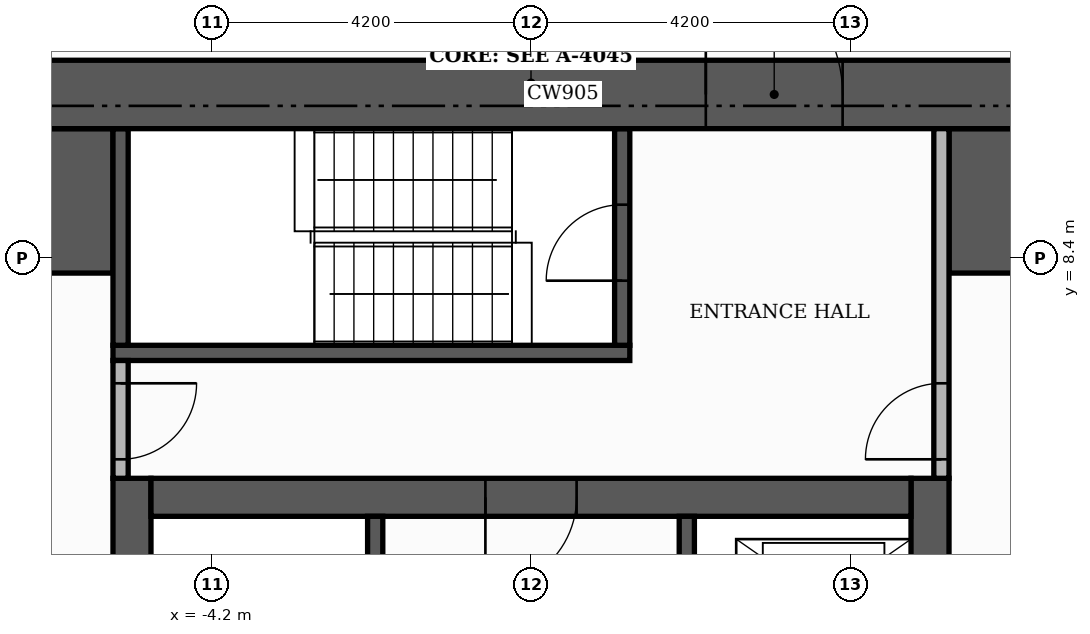
"""IFC4 building model, lengths in metres.
Left out: names, types, materials, properties, quantities, classifications, styles, units other than length and angle.
Written with IfcOpenShell. Run it as: python <this file> out.ifc"""

import sys

from ifc_helpers import new_model, si_unit, direction, frame, frame_2d, origin, place, context, subcontext, project, spatial, rectangle, extrude, element, fill, save


model = new_model("IFC4")
c1 = context("Model", 3, precision=1e-05, world=origin(), true_north=direction((0.0, 1.0)))
c2 = subcontext(c1, "Body", "Model", "MODEL_VIEW")
j1 = project(units=[si_unit("LENGTHUNIT", "METRE"), si_unit("PLANEANGLEUNIT", "RADIAN")], contexts=[c1])
p1 = place(None, origin())
s1 = spatial("IfcSite", under=j1, at=p1, CompositionType="ELEMENT")
p2 = place(p1, origin())
s2 = spatial("IfcBuilding", under=s1, at=p2, CompositionType="ELEMENT")
p3 = place(p2, frame((0.0, 0.0, 279.6)))
s3 = spatial("IfcBuildingStorey", under=s2, at=p3, CompositionType="ELEMENT", Elevation=279.6)
for number, where, z_axis, x_axis in (
    (1, (-5.25, -5.0, 0.0), (0.0, 0.0, 1.0), (0.0, 1.0, 0.0)),
    (2, (5.25, -5.0, 0.0), (0.0, 0.0, 1.0), (0.0, 1.0, 0.0)),
):
    element("IfcWall", number, at=place(p3, frame(where, z_axis=z_axis, x_axis=x_axis)), inside=s3, PredefinedType="SHEAR", context=c2, shape_type="SweptSolid", body=[
        extrude(rectangle(XDim=10.5, YDim=0.5, at=frame_2d((5.25, 0.0))), origin(), (0.0, 0.0, 1.0), 3.48),
    ])
p4 = place(p3, frame((-5.0, 5.25, 0.0), z_axis=(0.0, 0.0, 1.0), x_axis=(1.0, 0.0, 0.0)))
e3 = element("IfcWall", 3, at=p4, inside=s3, PredefinedType="SHEAR", context=c2, shape_type="SweptSolid", body=[
    extrude(rectangle(XDim=10.0, YDim=0.5, at=frame_2d((5.0, 0.0))), origin(), (0.0, 0.0, 1.0), 3.48),
])
p5 = place(p4, frame((4.4, 0.0, 0.0)))
e4 = element("IfcOpeningElement", 4, at=p5, cuts=e3, PredefinedType="OPENING", context=c2, shape_type="SweptSolid", body=[
    extrude(rectangle(XDim=1.2, YDim=2.1, at=frame_2d((0.6, 1.05))), frame((0.0, 0.26, 0.0), z_axis=(0.0, -1.0, 0.0), x_axis=(1.0, 0.0, 0.0)), (0.0, 0.0, 1.0), 0.52),
])
for number, where, z_axis, x_axis in (
    (5, (-10.1, 9.15, 0.0), (0.0, 0.0, 1.0), (1.0, 0.0, 0.0)),
    (6, (5.5, 9.15, 0.0), (0.0, 0.0, 1.0), (1.0, 0.0, 0.0)),
):
    element("IfcWall", number, at=place(p3, frame(where, z_axis=z_axis, x_axis=x_axis)), inside=s3, PredefinedType="SHEAR", context=c2, shape_type="SweptSolid", body=[
        extrude(rectangle(XDim=4.6, YDim=1.9, at=frame_2d((2.3, 0.0))), origin(), (0.0, 0.0, 1.0), 3.48),
    ])
p6 = place(p3, frame((-2.05, -1.4, 0.0), z_axis=(0.0, 0.0, 1.0), x_axis=(0.0, 1.0, 0.0)))
e7 = element("IfcWall", 7, at=p6, inside=s3, PredefinedType="SHEAR", context=c2, shape_type="SweptSolid", body=[
    extrude(rectangle(XDim=6.4, YDim=0.2, at=frame_2d((3.2, 0.0))), origin(), (0.0, 0.0, 1.0), 3.48),
])
p7 = place(p6, frame((0.15, 0.0, 0.0)))
e8 = element("IfcOpeningElement", 8, at=p7, cuts=e7, PredefinedType="OPENING", context=c2, shape_type="SweptSolid", body=[
    extrude(rectangle(XDim=1.0, YDim=2.1, at=frame_2d((0.5, 1.05))), frame((0.0, 0.11, 0.0), z_axis=(0.0, -1.0, 0.0), x_axis=(1.0, 0.0, 0.0)), (0.0, 0.0, 1.0), 0.22),
])
p8 = place(p3, frame((-5.5, 7.15, 0.0), z_axis=(0.0, 0.0, 1.0), x_axis=(1.0, 0.0, 0.0)))
e9 = element("IfcWall", 9, at=p8, inside=s3, PredefinedType="SHEAR", context=c2, shape_type="SweptSolid", body=[
    extrude(rectangle(XDim=6.8, YDim=0.2, at=frame_2d((3.4, 0.0))), origin(), (0.0, 0.0, 1.0), 3.48),
])
p9 = place(p3, frame((-5.4, 7.25, 0.0), z_axis=(0.0, 0.0, 1.0), x_axis=(0.0, 1.0, 0.0)))
e10 = element("IfcWall", 10, at=p9, inside=s3, PredefinedType="SHEAR", context=c2, shape_type="SweptSolid", body=[
    extrude(rectangle(XDim=2.85, YDim=0.2, at=frame_2d((1.425, 0.0))), origin(), (0.0, 0.0, 1.0), 3.48),
])
p10 = place(p3, frame((1.2, 7.25, 0.0), z_axis=(0.0, 0.0, 1.0), x_axis=(0.0, 1.0, 0.0)))
e11 = element("IfcWall", 11, at=p10, inside=s3, PredefinedType="SHEAR", context=c2, shape_type="SweptSolid", body=[
    extrude(rectangle(XDim=2.85, YDim=0.2, at=frame_2d((1.425, 0.0))), origin(), (0.0, 0.0, 1.0), 3.48),
])
p11 = place(p10, frame((0.85, 0.0, 0.0)))
e12 = element("IfcOpeningElement", 12, at=p11, cuts=e11, PredefinedType="OPENING", context=c2, shape_type="SweptSolid", body=[
    extrude(rectangle(XDim=1.0, YDim=2.1, at=frame_2d((0.5, 1.05))), frame((0.0, 0.11, 0.0), z_axis=(0.0, -1.0, 0.0), x_axis=(1.0, 0.0, 0.0)), (0.0, 0.0, 1.0), 0.22),
])
p12 = place(p3, frame((2.05, 1.6, 0.0), z_axis=(0.0, 0.0, 1.0), x_axis=(0.0, 1.0, 0.0)))
e13 = element("IfcWall", 13, at=p12, inside=s3, PredefinedType="SHEAR", context=c2, shape_type="SweptSolid", body=[
    extrude(rectangle(XDim=3.4, YDim=0.2, at=frame_2d((1.7, 0.0))), origin(), (0.0, 0.0, 1.0), 3.48),
])
p13 = place(p12, frame((1.75, 0.0, 0.0)))
e14 = element("IfcOpeningElement", 14, at=p13, cuts=e13, PredefinedType="OPENING", context=c2, shape_type="SweptSolid", body=[
    extrude(rectangle(XDim=1.1, YDim=2.1, at=frame_2d((0.55, 1.05))), frame((0.0, 0.11, 0.0), z_axis=(0.0, -1.0, 0.0), x_axis=(1.0, 0.0, 0.0)), (0.0, 0.0, 1.0), 0.22),
])
p14 = place(p12, frame((0.15, 0.0, 0.0)))
e15 = element("IfcOpeningElement", 15, at=p14, cuts=e13, PredefinedType="OPENING", context=c2, shape_type="SweptSolid", body=[
    extrude(rectangle(XDim=0.8, YDim=2.1, at=frame_2d((0.4, 1.05))), frame((0.0, 0.11, 0.0), z_axis=(0.0, -1.0, 0.0), x_axis=(1.0, 0.0, 0.0)), (0.0, 0.0, 1.0), 0.22),
])
p15 = place(p3, frame((-11.0, 10.55, 0.0), z_axis=(0.0, 0.0, 1.0), x_axis=(1.0, 0.0, 0.0)))
e16 = element("IfcWall", 16, at=p15, inside=s3, PredefinedType="SHEAR", context=c2, shape_type="SweptSolid", body=[
    extrude(rectangle(XDim=22.0, YDim=0.9, at=frame_2d((11.0, 0.0))), origin(), (0.0, 0.0, 1.0), 3.48),
])
p16 = place(p15, frame((13.3, 0.0, 0.0)))
e17 = element("IfcOpeningElement", 17, at=p16, cuts=e16, PredefinedType="OPENING", context=c2, shape_type="SweptSolid", body=[
    extrude(rectangle(XDim=1.8, YDim=2.2, at=frame_2d((0.9, 1.1))), frame((0.0, 0.46, 0.0), z_axis=(0.0, -1.0, 0.0), x_axis=(1.0, 0.0, 0.0)), (0.0, 0.0, 1.0), 0.92),
])
p17 = place(p3, frame((-5.4, 5.5, 0.0), z_axis=(0.0, 0.0, 1.0), x_axis=(0.0, 1.0, 0.0)))
e18 = element("IfcWall", 18, at=p17, inside=s3, PredefinedType="PARTITIONING", context=c2, shape_type="SweptSolid", body=[
    extrude(rectangle(XDim=1.55, YDim=0.2, at=frame_2d((0.775, 0.0))), origin(), (0.0, 0.0, 1.0), 3.48),
])
p18 = place(p17, frame((0.25, 0.0, 0.0)))
e19 = element("IfcOpeningElement", 19, at=p18, cuts=e18, PredefinedType="OPENING", context=c2, shape_type="SweptSolid", body=[
    extrude(rectangle(XDim=1.0, YDim=2.1, at=frame_2d((0.5, 1.05))), frame((0.0, 0.11, 0.0), z_axis=(0.0, -1.0, 0.0), x_axis=(1.0, 0.0, 0.0)), (0.0, 0.0, 1.0), 0.22),
])
p19 = place(p3, frame((5.4, 5.5, 0.0), z_axis=(0.0, 0.0, 1.0), x_axis=(0.0, 1.0, 0.0)))
e20 = element("IfcWall", 20, at=p19, inside=s3, PredefinedType="PARTITIONING", context=c2, shape_type="SweptSolid", body=[
    extrude(rectangle(XDim=4.6, YDim=0.2, at=frame_2d((2.3, 0.0))), origin(), (0.0, 0.0, 1.0), 3.48),
])
p20 = place(p19, frame((0.25, 0.0, 0.0)))
e21 = element("IfcOpeningElement", 21, at=p20, cuts=e20, PredefinedType="OPENING", context=c2, shape_type="SweptSolid", body=[
    extrude(rectangle(XDim=1.0, YDim=2.1, at=frame_2d((0.5, 1.05))), frame((0.0, 0.11, 0.0), z_axis=(0.0, -1.0, 0.0), x_axis=(1.0, 0.0, 0.0)), (0.0, 0.0, 1.0), 0.22),
])
p21 = place(p5, frame((1.2, 0.0, 0.0), z_axis=(0.0, 0.0, 1.0), x_axis=(-1.0, 0.0, 0.0)))
e22 = element("IfcDoor", 22, at=p21, inside=s3, OperationType="SINGLE_SWING_LEFT", PredefinedType="DOOR", context=c2, shape_type="SweptSolid", body=[
    extrude(rectangle(XDim=1.2, YDim=2.1, at=frame_2d((0.6, 1.05))), frame((0.0, 0.025, 0.0), z_axis=(0.0, -1.0, 0.0), x_axis=(1.0, 0.0, 0.0)), (0.0, 0.0, 1.0), 0.05),
])
fill(e4, e22)
p22 = place(p11, origin())
e23 = element("IfcDoor", 23, at=p22, inside=s3, OperationType="SINGLE_SWING_LEFT", PredefinedType="DOOR", context=c2, shape_type="SweptSolid", body=[
    extrude(rectangle(XDim=1.0, YDim=2.1, at=frame_2d((0.5, 1.05))), frame((0.0, 0.025, 0.0), z_axis=(0.0, -1.0, 0.0), x_axis=(1.0, 0.0, 0.0)), (0.0, 0.0, 1.0), 0.05),
])
fill(e12, e23)
p23 = place(p18, frame((1.0, 0.0, 0.0), z_axis=(0.0, 0.0, 1.0), x_axis=(-1.0, 0.0, 0.0)))
e24 = element("IfcDoor", 24, at=p23, inside=s3, OperationType="SINGLE_SWING_RIGHT", PredefinedType="DOOR", context=c2, shape_type="SweptSolid", body=[
    extrude(rectangle(XDim=1.0, YDim=2.1, at=frame_2d((0.5, 1.05))), frame((0.0, 0.025, 0.0), z_axis=(0.0, -1.0, 0.0), x_axis=(1.0, 0.0, 0.0)), (0.0, 0.0, 1.0), 0.05),
])
fill(e19, e24)
p24 = place(p20, origin())
e25 = element("IfcDoor", 25, at=p24, inside=s3, OperationType="SINGLE_SWING_LEFT", PredefinedType="DOOR", context=c2, shape_type="SweptSolid", body=[
    extrude(rectangle(XDim=1.0, YDim=2.1, at=frame_2d((0.5, 1.05))), frame((0.0, 0.025, 0.0), z_axis=(0.0, -1.0, 0.0), x_axis=(1.0, 0.0, 0.0)), (0.0, 0.0, 1.0), 0.05),
])
fill(e21, e25)
p25 = place(p16, origin())
e26 = element("IfcDoor", 26, at=p25, inside=s3, OperationType="DOUBLE_DOOR_SINGLE_SWING", PredefinedType="DOOR", context=c2, shape_type="SweptSolid", body=[
    extrude(rectangle(XDim=1.8, YDim=2.2, at=frame_2d((0.9, 1.1))), frame((0.0, 0.025, 0.0), z_axis=(0.0, -1.0, 0.0), x_axis=(1.0, 0.0, 0.0)), (0.0, 0.0, 1.0), 0.05),
])
fill(e17, e26)
save(model, sys.argv[1])
